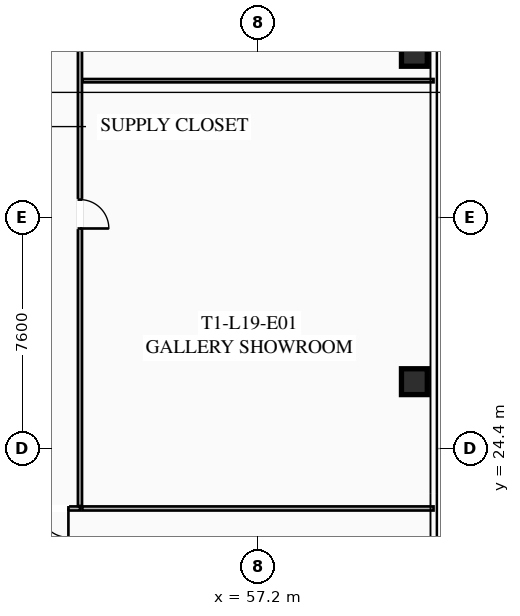
"""IFC4 building model, lengths in metres.
Left out: names, types, materials, properties, quantities, classifications, styles, units other than length and angle.
Written with IfcOpenShell. Run it as: python <this file> out.ifc"""

import sys

from ifc_helpers import new_model, si_unit, direction, frame, frame_2d, origin, origin_2d, place, context, subcontext, project, spatial, rectangle, hollow_rectangle, extrude, element, fill, save


model = new_model("IFC4")
c1 = context("Model", 3, precision=1e-05, world=origin(), true_north=direction((0.0, 1.0)))
c2 = subcontext(c1, "Body", "Model", "MODEL_VIEW")
j1 = project(units=[si_unit("LENGTHUNIT", "METRE"), si_unit("PLANEANGLEUNIT", "RADIAN")], contexts=[c1])
p1 = place(None, origin())
s1 = spatial("IfcSite", under=j1, at=p1, CompositionType="ELEMENT")
p2 = place(p1, origin())
s2 = spatial("IfcBuilding", under=s1, at=p2, CompositionType="ELEMENT")
p3 = place(p2, frame((0.0, 0.0, 74.3)))
s3 = spatial("IfcBuildingStorey", under=s2, at=p3, CompositionType="ELEMENT", Elevation=74.3)
for number, where, z_axis, x_axis in (
    (1, (62.35, 26.6, 0.0), (0.0, 0.0, 1.0), (1.0, 0.0, 0.0)),
    (2, (62.35, 37.4, 0.0), (0.0, 0.0, 1.0), (1.0, 0.0, 0.0)),
):
    element("IfcColumn", number, at=place(p3, frame(where, z_axis=z_axis, x_axis=x_axis)), inside=s3, PredefinedType="COLUMN", context=c2, shape_type="SweptSolid", body=[
        extrude(hollow_rectangle(XDim=0.85, YDim=0.85, WallThickness=0.035, at=origin_2d()), origin(), (0.0, 0.0, 1.0), 3.35),
    ])
p4 = place(p3, frame((51.35, 22.43, 0.0), z_axis=(0.0, 0.0, 1.0), x_axis=(-1.0, 0.0, 0.0)))
e3 = element("IfcWall", 3, at=p4, inside=s3, PredefinedType="PARTITIONING", context=c2, shape_type="SweptSolid", body=[
    extrude(rectangle(XDim=27.3, YDim=0.135, at=frame_2d((13.65, 0.0))), origin(), (0.0, 0.0, 1.0), 2.703),
])
p5 = place(p4, frame((25.97, 0.0, 0.0)))
e4 = element("IfcOpeningElement", 4, at=p5, cuts=e3, PredefinedType="OPENING", context=c2, shape_type="SweptSolid", body=[
    extrude(rectangle(XDim=0.95, YDim=2.05, at=frame_2d((0.475, 1.025))), frame((0.0, 0.077, 0.0), z_axis=(0.0, -1.0, 0.0), x_axis=(1.0, 0.0, 0.0)), (0.0, 0.0, 1.0), 0.155),
])
p6 = place(p4, frame((12.698, 0.0, 0.0)))
e5 = element("IfcOpeningElement", 5, at=p6, cuts=e3, PredefinedType="OPENING", context=c2, shape_type="SweptSolid", body=[
    extrude(rectangle(XDim=0.95, YDim=2.05, at=frame_2d((0.475, 1.025))), frame((0.0, 0.077, 0.0), z_axis=(0.0, -1.0, 0.0), x_axis=(1.0, 0.0, 0.0)), (0.0, 0.0, 1.0), 0.155),
])
p7 = place(p4, frame((8.639, 0.0, 0.0)))
e6 = element("IfcOpeningElement", 6, at=p7, cuts=e3, PredefinedType="OPENING", context=c2, shape_type="SweptSolid", body=[
    extrude(rectangle(XDim=0.95, YDim=2.05, at=frame_2d((0.475, 1.025))), frame((0.0, 0.077, 0.0), z_axis=(0.0, -1.0, 0.0), x_axis=(1.0, 0.0, 0.0)), (0.0, 0.0, 1.0), 0.155),
])
p8 = place(p4, frame((0.38, 0.0, 0.0)))
e7 = element("IfcOpeningElement", 7, at=p8, cuts=e3, PredefinedType="OPENING", context=c2, shape_type="SweptSolid", body=[
    extrude(rectangle(XDim=0.95, YDim=2.05, at=frame_2d((0.475, 1.025))), frame((0.0, 0.077, 0.0), z_axis=(0.0, -1.0, 0.0), x_axis=(1.0, 0.0, 0.0)), (0.0, 0.0, 1.0), 0.155),
])
p9 = place(p3, frame((51.35, 42.77, 0.0), z_axis=(0.0, 0.0, 1.0), x_axis=(0.0, -1.0, 0.0)))
e8 = element("IfcWall", 8, at=p9, inside=s3, PredefinedType="PARTITIONING", context=c2, shape_type="SweptSolid", body=[
    extrude(rectangle(XDim=20.26, YDim=0.135, at=frame_2d((10.13, 0.0))), origin(), (0.0, 0.0, 1.0), 2.703),
])
p10 = place(p9, frame((10.181, 0.0, 0.0)))
e9 = element("IfcOpeningElement", 9, at=p10, cuts=e8, PredefinedType="OPENING", context=c2, shape_type="SweptSolid", body=[
    extrude(rectangle(XDim=0.95, YDim=2.05, at=frame_2d((0.475, 1.025))), frame((0.0, 0.077, 0.0), z_axis=(0.0, -1.0, 0.0), x_axis=(1.0, 0.0, 0.0)), (0.0, 0.0, 1.0), 0.155),
])
p11 = place(p9, frame((0.3, 0.0, 0.0)))
e10 = element("IfcOpeningElement", 10, at=p11, cuts=e8, PredefinedType="OPENING", context=c2, shape_type="SweptSolid", body=[
    extrude(rectangle(XDim=0.95, YDim=2.05, at=frame_2d((0.475, 1.025))), frame((0.0, 0.077, 0.0), z_axis=(0.0, -1.0, 0.0), x_axis=(1.0, 0.0, 0.0)), (0.0, 0.0, 1.0), 0.155),
])
p12 = place(p3, frame((51.43, 22.43, 0.0), z_axis=(0.0, 0.0, 1.0), x_axis=(1.0, 0.0, 0.0)))
e11 = element("IfcWall", 11, at=p12, inside=s3, PredefinedType="PARTITIONING", context=c2, shape_type="SweptSolid", body=[
    extrude(rectangle(XDim=11.55, YDim=0.135, at=frame_2d((5.775, 0.0))), origin(), (0.0, 0.0, 1.0), 2.703),
])
p13 = place(p3, frame((51.43, 36.5, 0.0), z_axis=(0.0, 0.0, 1.0), x_axis=(1.0, 0.0, 0.0)))
e12 = element("IfcWall", 12, at=p13, inside=s3, PredefinedType="PARTITIONING", context=c2, shape_type="SweptSolid", body=[
    extrude(rectangle(XDim=11.55, YDim=0.11, at=frame_2d((5.775, 0.0))), origin(), (0.0, 0.0, 1.0), 2.703),
])
p14 = place(p8, origin())
e13 = element("IfcDoor", 13, at=p14, inside=s3, OperationType="SINGLE_SWING_LEFT", PredefinedType="DOOR", context=c2, shape_type="SweptSolid", body=[
    extrude(rectangle(XDim=0.95, YDim=2.05, at=frame_2d((0.475, 1.025))), frame((0.0, 0.025, 0.0), z_axis=(0.0, -1.0, 0.0), x_axis=(1.0, 0.0, 0.0)), (0.0, 0.0, 1.0), 0.05),
])
fill(e7, e13)
p15 = place(p10, origin())
e14 = element("IfcDoor", 14, at=p15, inside=s3, OperationType="SINGLE_SWING_RIGHT", PredefinedType="DOOR", context=c2, shape_type="SweptSolid", body=[
    extrude(rectangle(XDim=0.95, YDim=2.05, at=frame_2d((0.475, 1.025))), frame((0.0, 0.025, 0.0), z_axis=(0.0, -1.0, 0.0), x_axis=(1.0, 0.0, 0.0)), (0.0, 0.0, 1.0), 0.05),
])
fill(e9, e14)
save(model, sys.argv[1])
